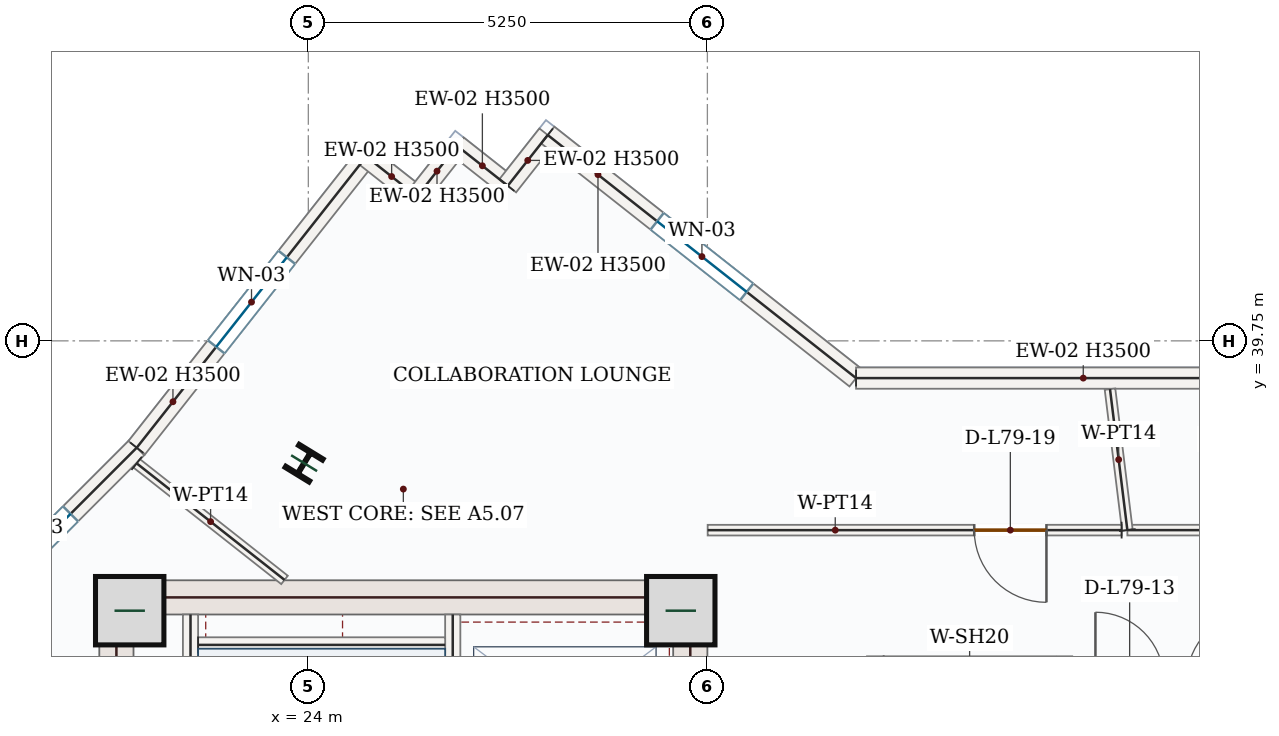
"""IFC4 building model, lengths in metres.
Left out: names, types, materials, properties, quantities, classifications, styles, units other than length and angle.
Written with IfcOpenShell. Run it as: python <this file> out.ifc"""

import sys

from ifc_helpers import new_model, si_unit, direction, frame, frame_2d, origin, origin_2d, place, context, subcontext, project, spatial, rectangle, i_section, extrude, source, transform, mapped, element, fill, save


model = new_model("IFC4")
c1 = context("Model", 3, precision=1e-05, world=origin(), true_north=direction((0.0, 1.0)))
c2 = subcontext(c1, "Body", "Model", "MODEL_VIEW")
j1 = project(units=[si_unit("LENGTHUNIT", "METRE"), si_unit("PLANEANGLEUNIT", "RADIAN")], contexts=[c1])
p1 = place(None, origin())
s1 = spatial("IfcSite", under=j1, at=p1, CompositionType="ELEMENT")
p2 = place(p1, origin())
s2 = spatial("IfcBuilding", under=s1, at=p2, CompositionType="ELEMENT")
p3 = place(p2, frame((0.0, 0.0, 327.3)))
s3 = spatial("IfcBuildingStorey", under=s2, at=p3, CompositionType="ELEMENT", Elevation=327.3)
m1 = source(origin(), c2, "Body", "SweptSolid", [
    extrude(rectangle(XDim=8.55, YDim=0.45, at=frame_2d((4.275, 0.0))), origin(), (0.0, 0.0, 1.0), 3.5),
])
p4 = place(p3, frame((21.475, 28.05, 0.0), z_axis=(0.0, 0.0, 1.0), x_axis=(0.0, 1.0, 0.0)))
e1 = element("IfcWall", 1, at=p4, inside=s3, PredefinedType="SHEAR", context=c2, shape_type="MappedRepresentation", body=[
    mapped(m1, transform((0.0, 0.0, 0.0), x_axis=(1.0, 0.0, 0.0), y_axis=(0.0, 1.0, 0.0), z_axis=(0.0, 0.0, 1.0), scale=1.0)),
])
p5 = place(p3, frame((29.025, 28.05, 0.0), z_axis=(0.0, 0.0, 1.0), x_axis=(0.0, 1.0, 0.0)))
e2 = element("IfcWall", 2, at=p5, inside=s3, PredefinedType="SHEAR", context=c2, shape_type="SweptSolid", body=[
    extrude(rectangle(XDim=8.55, YDim=0.45, at=frame_2d((4.275, 0.0))), origin(), (0.0, 0.0, 1.0), 3.5),
])
p6 = place(p5, frame((1.5, 0.0, 0.0)))
e3 = element("IfcOpeningElement", 3, at=p6, cuts=e2, PredefinedType="OPENING", context=c2, shape_type="SweptSolid", body=[
    extrude(rectangle(XDim=1.1, YDim=2.2, at=frame_2d((0.55, 1.1))), frame((0.0, 0.235, 0.0), z_axis=(0.0, -1.0, 0.0), x_axis=(1.0, 0.0, 0.0)), (0.0, 0.0, 1.0), 0.47),
])
m2 = source(origin(), c2, "Body", "SweptSolid", [
    extrude(rectangle(XDim=7.1, YDim=0.45, at=frame_2d((3.55, 0.0))), origin(), (0.0, 0.0, 1.0), 3.5),
])
p7 = place(p3, frame((21.7, 36.375, 0.0), z_axis=(0.0, 0.0, 1.0), x_axis=(1.0, 0.0, 0.0)))
e4 = element("IfcWall", 4, at=p7, inside=s3, PredefinedType="SHEAR", context=c2, shape_type="MappedRepresentation", body=[
    mapped(m2, transform((0.0, 0.0, 0.0), x_axis=(1.0, 0.0, 0.0), y_axis=(0.0, 1.0, 0.0), z_axis=(0.0, 0.0, 1.0), scale=1.0)),
])
m3 = source(origin(), c2, "Body", "SweptSolid", [
    extrude(rectangle(XDim=0.9, YDim=0.9, at=origin_2d()), origin(), (0.0, 0.0, 1.0), 3.75),
])
for number, where, z_axis, x_axis in (
    (5, (21.65, 36.2, 0.0), (0.0, 0.0, 1.0), (1.0, 0.0, 0.0)),
    (6, (28.9, 36.2, 0.0), (0.0, 0.0, 1.0), (1.0, 0.0, 0.0)),
):
    element("IfcColumn", number, at=place(p3, frame(where, z_axis=z_axis, x_axis=x_axis)), inside=s3, PredefinedType="COLUMN", context=c2, shape_type="MappedRepresentation", body=[
        mapped(m3, transform((0.0, 0.0, 0.0), x_axis=(1.0, 0.0, 0.0), y_axis=(0.0, 1.0, 0.0), z_axis=(0.0, 0.0, 1.0), scale=1.0)),
    ])
m4 = source(origin(), c2, "Body", "SweptSolid", [
    extrude(i_section(OverallWidth=0.369, OverallDepth=0.356, WebThickness=0.011, FlangeThickness=0.018, FilletRadius=0.018, at=origin_2d()), origin(), (0.0, 0.0, 1.0), 3.75),
])
p8 = place(p3, frame((23.945, 38.141, 0.0), z_axis=(0.0, 0.0, 1.0), x_axis=(-0.852640164354, 0.522498564716, 0.0)))
e7 = element("IfcColumn", 7, at=p8, inside=s3, PredefinedType="COLUMN", context=c2, shape_type="MappedRepresentation", body=[
    mapped(m4, transform((0.0, 0.0, 0.0), x_axis=(1.0, 0.0, 0.0), y_axis=(0.0, 1.0, 0.0), z_axis=(0.0, 0.0, 1.0), scale=1.0)),
])
p9 = place(p3, frame((18.94, 35.542, 0.0), z_axis=(0.0, 0.0, 1.0), x_axis=(0.707106781187, 0.707106781187, 0.0)))
e8 = element("IfcWall", 8, at=p9, inside=s3, PredefinedType="SOLIDWALL", context=c2, shape_type="SweptSolid", body=[
    extrude(rectangle(XDim=3.963, YDim=0.28, at=frame_2d((1.982, 0.0))), origin(), (0.0, 0.0, 1.0), 3.5),
])
p10 = place(p9, frame((1.232, 0.0, 0.85)))
e9 = element("IfcOpeningElement", 9, at=p10, cuts=e8, PredefinedType="OPENING", context=c2, shape_type="SweptSolid", body=[
    extrude(rectangle(XDim=1.5, YDim=1.5, at=frame_2d((0.75, 0.75))), frame((0.0, 0.15, 0.0), z_axis=(0.0, -1.0, 0.0), x_axis=(1.0, 0.0, 0.0)), (0.0, 0.0, 1.0), 0.3),
])
p11 = place(p3, frame((21.742, 38.344, 0.0), z_axis=(0.0, 0.0, 1.0), x_axis=(0.619093990715, 0.785316898239, 0.0)))
e10 = element("IfcWall", 10, at=p11, inside=s3, PredefinedType="SOLIDWALL", context=c2, shape_type="SweptSolid", body=[
    extrude(rectangle(XDim=4.878, YDim=0.28, at=frame_2d((2.439, 0.0))), origin(), (0.0, 0.0, 1.0), 3.5),
])
p12 = place(p11, frame((1.689, 0.0, 0.85)))
e11 = element("IfcOpeningElement", 11, at=p12, cuts=e10, PredefinedType="OPENING", context=c2, shape_type="SweptSolid", body=[
    extrude(rectangle(XDim=1.5, YDim=1.5, at=frame_2d((0.75, 0.75))), frame((0.0, 0.15, 0.0), z_axis=(0.0, -1.0, 0.0), x_axis=(1.0, 0.0, 0.0)), (0.0, 0.0, 1.0), 0.3),
])
m5 = source(origin(), c2, "Body", "SweptSolid", [
    extrude(rectangle(XDim=0.85, YDim=0.28, at=frame_2d((0.425, 0.0))), origin(), (0.0, 0.0, 1.0), 3.5),
])
p13 = place(p3, frame((24.762, 42.175, 0.0), z_axis=(0.0, 0.0, 1.0), x_axis=(0.785360476625, -0.619038707801, 0.0)))
e12 = element("IfcWall", 12, at=p13, inside=s3, PredefinedType="SOLIDWALL", context=c2, shape_type="MappedRepresentation", body=[
    mapped(m5, transform((0.0, 0.0, 0.0), x_axis=(1.0, 0.0, 0.0), y_axis=(0.0, 1.0, 0.0), z_axis=(0.0, 0.0, 1.0), scale=1.0)),
])
m6 = source(origin(), c2, "Body", "SweptSolid", [
    extrude(rectangle(XDim=0.85, YDim=0.28, at=frame_2d((0.425, 0.0))), origin(), (0.0, 0.0, 1.0), 3.5),
])
for number, where, z_axis, x_axis in (
    (13, (25.43, 41.649, 0.0), (0.0, 0.0, 1.0), (0.619, 0.785, 0.0)),
    (14, (25.956, 42.316, 0.0), (0.0, 0.0, 1.0), (0.785, -0.619, 0.0)),
):
    element("IfcWall", number, at=place(p3, frame(where, z_axis=z_axis, x_axis=x_axis)), inside=s3, PredefinedType="SOLIDWALL", context=c2, shape_type="MappedRepresentation", body=[
        mapped(m6, transform((0.0, 0.0, 0.0), x_axis=(1.0, 0.0, 0.0), y_axis=(0.0, 1.0, 0.0), z_axis=(0.0, 0.0, 1.0), scale=1.0)),
    ])
m7 = source(origin(), c2, "Body", "SweptSolid", [
    extrude(rectangle(XDim=0.85, YDim=0.28, at=frame_2d((0.425, 0.0))), origin(), (0.0, 0.0, 1.0), 3.5),
])
p14 = place(p3, frame((26.624, 41.79, 0.0), z_axis=(0.0, 0.0, 1.0), x_axis=(0.619076214196, 0.785330911793, 0.0)))
e15 = element("IfcWall", 15, at=p14, inside=s3, PredefinedType="SOLIDWALL", context=c2, shape_type="MappedRepresentation", body=[
    mapped(m7, transform((0.0, 0.0, 0.0), x_axis=(1.0, 0.0, 0.0), y_axis=(0.0, 1.0, 0.0), z_axis=(0.0, 0.0, 1.0), scale=1.0)),
])
p15 = place(p3, frame((27.15, 42.458, 0.0), z_axis=(0.0, 0.0, 1.0), x_axis=(0.78530363687, -0.61911081231, 0.0)))
e16 = element("IfcWall", 16, at=p15, inside=s3, PredefinedType="SOLIDWALL", context=c2, shape_type="SweptSolid", body=[
    extrude(rectangle(XDim=5.165, YDim=0.28, at=frame_2d((2.583, 0.0))), origin(), (0.0, 0.0, 1.0), 3.5),
])
p16 = place(p15, frame((1.833, 0.0, 0.85)))
e17 = element("IfcOpeningElement", 17, at=p16, cuts=e16, PredefinedType="OPENING", context=c2, shape_type="SweptSolid", body=[
    extrude(rectangle(XDim=1.5, YDim=1.5, at=frame_2d((0.75, 0.75))), frame((0.0, 0.15, 0.0), z_axis=(0.0, -1.0, 0.0), x_axis=(1.0, 0.0, 0.0)), (0.0, 0.0, 1.0), 0.3),
])
m8 = source(origin(), c2, "Body", "SweptSolid", [
    extrude(rectangle(XDim=5.978, YDim=0.28, at=frame_2d((2.989, 0.0))), origin(), (0.0, 0.0, 1.0), 3.5),
])
p17 = place(p3, frame((31.206, 39.26, 0.0), z_axis=(0.0, 0.0, 1.0), x_axis=(1.0, 0.0, 0.0)))
e18 = element("IfcWall", 18, at=p17, inside=s3, PredefinedType="SOLIDWALL", context=c2, shape_type="MappedRepresentation", body=[
    mapped(m8, transform((0.0, 0.0, 0.0), x_axis=(1.0, 0.0, 0.0), y_axis=(0.0, 1.0, 0.0), z_axis=(0.0, 0.0, 1.0), scale=1.0)),
])
m9 = source(origin(), c2, "Body", "SweptSolid", [
    extrude(rectangle(XDim=7.87, YDim=0.2, at=frame_2d((3.935, 0.0))), origin(), (0.0, 0.0, 1.0), 3.5),
])
p18 = place(p3, frame((22.45, 28.28, 0.0), z_axis=(0.0, 0.0, 1.0), x_axis=(0.0, 1.0, 0.0)))
e19 = element("IfcWall", 19, at=p18, inside=s3, PredefinedType="SOLIDWALL", context=c2, shape_type="MappedRepresentation", body=[
    mapped(m9, transform((0.0, 0.0, 0.0), x_axis=(1.0, 0.0, 0.0), y_axis=(0.0, 1.0, 0.0), z_axis=(0.0, 0.0, 1.0), scale=1.0)),
])
p19 = place(p3, frame((25.9, 28.15, 0.0), z_axis=(0.0, 0.0, 1.0), x_axis=(0.0, 1.0, 0.0)))
e20 = element("IfcWall", 20, at=p19, inside=s3, PredefinedType="SOLIDWALL", context=c2, shape_type="SweptSolid", body=[
    extrude(rectangle(XDim=8.0, YDim=0.2, at=frame_2d((4.0, 0.0))), origin(), (0.0, 0.0, 1.0), 3.5),
])
p20 = place(p19, frame((0.4, 0.0, 0.0)))
e21 = element("IfcOpeningElement", 21, at=p20, cuts=e20, PredefinedType="OPENING", context=c2, shape_type="SweptSolid", body=[
    extrude(rectangle(XDim=1.05, YDim=2.15, at=frame_2d((0.525, 1.075))), frame((0.0, 0.11, 0.0), z_axis=(0.0, -1.0, 0.0), x_axis=(1.0, 0.0, 0.0)), (0.0, 0.0, 1.0), 0.22),
])
m10 = source(origin(), c2, "Body", "SweptSolid", [
    extrude(rectangle(XDim=3.25, YDim=0.2, at=frame_2d((1.625, 0.0))), origin(), (0.0, 0.0, 1.0), 3.5),
])
p21 = place(p3, frame((22.55, 35.75, 0.0), z_axis=(0.0, 0.0, 1.0), x_axis=(1.0, 0.0, 0.0)))
e22 = element("IfcWall", 22, at=p21, inside=s3, PredefinedType="SOLIDWALL", context=c2, shape_type="MappedRepresentation", body=[
    mapped(m10, transform((0.0, 0.0, 0.0), x_axis=(1.0, 0.0, 0.0), y_axis=(0.0, 1.0, 0.0), z_axis=(0.0, 0.0, 1.0), scale=1.0)),
])
p22 = place(p3, frame((31.45, 33.2, 0.0), z_axis=(0.0, 0.0, 1.0), x_axis=(0.0, 1.0, 0.0)))
e23 = element("IfcWall", 23, at=p22, inside=s3, PredefinedType="SOLIDWALL", context=c2, shape_type="SweptSolid", body=[
    extrude(rectangle(XDim=2.4, YDim=0.2, at=frame_2d((1.2, 0.0))), origin(), (0.0, 0.0, 1.0), 3.5),
])
p23 = place(p22, frame((0.65, 0.0, 0.0)))
e24 = element("IfcOpeningElement", 24, at=p23, cuts=e23, PredefinedType="OPENING", context=c2, shape_type="SweptSolid", body=[
    extrude(rectangle(XDim=1.1, YDim=2.15, at=frame_2d((0.55, 1.075))), frame((0.0, 0.11, 0.0), z_axis=(0.0, -1.0, 0.0), x_axis=(1.0, 0.0, 0.0)), (0.0, 0.0, 1.0), 0.22),
])
m11 = source(origin(), c2, "Body", "SweptSolid", [
    extrude(rectangle(XDim=2.4, YDim=0.2, at=frame_2d((1.2, 0.0))), origin(), (0.0, 0.0, 1.0), 3.5),
])
p24 = place(p3, frame((33.95, 33.2, 0.0), z_axis=(0.0, 0.0, 1.0), x_axis=(0.0, 1.0, 0.0)))
e25 = element("IfcWall", 25, at=p24, inside=s3, PredefinedType="SOLIDWALL", context=c2, shape_type="MappedRepresentation", body=[
    mapped(m11, transform((0.0, 0.0, 0.0), x_axis=(1.0, 0.0, 0.0), y_axis=(0.0, 1.0, 0.0), z_axis=(0.0, 0.0, 1.0), scale=1.0)),
])
m12 = source(origin(), c2, "Body", "SweptSolid", [
    extrude(rectangle(XDim=2.477, YDim=0.14, at=frame_2d((1.239, 0.0))), origin(), (0.0, 0.0, 1.0), 3.5),
])
p25 = place(p3, frame((21.742, 38.138, 0.0), z_axis=(0.0, 0.0, 1.0), x_axis=(0.785339198937, -0.619065701371, 0.0)))
e26 = element("IfcWall", 26, at=p25, inside=s3, PredefinedType="PARTITIONING", context=c2, shape_type="MappedRepresentation", body=[
    mapped(m12, transform((0.0, 0.0, 0.0), x_axis=(1.0, 0.0, 0.0), y_axis=(0.0, 1.0, 0.0), z_axis=(0.0, 0.0, 1.0), scale=1.0)),
])
p26 = place(p3, frame((40.612, 37.26, 0.0), z_axis=(0.0, 0.0, 1.0), x_axis=(-1.0, 0.0, 0.0)))
e27 = element("IfcWall", 27, at=p26, inside=s3, PredefinedType="PARTITIONING", context=c2, shape_type="SweptSolid", body=[
    extrude(rectangle(XDim=5.837, YDim=0.14, at=frame_2d((2.918, 0.0))), origin(), (0.0, 0.0, 1.0), 3.5),
])
p27 = place(p26, frame((3.812, 0.0, 0.0)))
e28 = element("IfcOpeningElement", 28, at=p27, cuts=e27, PredefinedType="OPENING", context=c2, shape_type="SweptSolid", body=[
    extrude(rectangle(XDim=0.95, YDim=2.15, at=frame_2d((0.475, 1.075))), frame((0.0, 0.08, 0.0), z_axis=(0.0, -1.0, 0.0), x_axis=(1.0, 0.0, 0.0)), (0.0, 0.0, 1.0), 0.16),
])
m13 = source(origin(), c2, "Body", "SweptSolid", [
    extrude(rectangle(XDim=1.869, YDim=0.14, at=frame_2d((0.934, 0.0))), origin(), (0.0, 0.0, 1.0), 3.5),
])
p28 = place(p3, frame((34.775, 37.26, 0.0), z_axis=(0.0, 0.0, 1.0), x_axis=(-0.122153221409, 0.992511254596, 0.0)))
e29 = element("IfcWall", 29, at=p28, inside=s3, PredefinedType="PARTITIONING", context=c2, shape_type="MappedRepresentation", body=[
    mapped(m13, transform((0.0, 0.0, 0.0), x_axis=(1.0, 0.0, 0.0), y_axis=(0.0, 1.0, 0.0), z_axis=(0.0, 0.0, 1.0), scale=1.0)),
])
p29 = place(p3, frame((34.7, 37.26, 0.0), z_axis=(0.0, 0.0, 1.0), x_axis=(-0.999999995981, -8.9657955e-05, 0.0)))
e30 = element("IfcWall", 30, at=p29, inside=s3, PredefinedType="PARTITIONING", context=c2, shape_type="SweptSolid", body=[
    extrude(rectangle(XDim=5.446, YDim=0.14, at=frame_2d((2.723, 0.0))), origin(), (0.0, 0.0, 1.0), 3.5),
])
p30 = place(p29, frame((0.989, 0.0, 0.0)))
e31 = element("IfcOpeningElement", 31, at=p30, cuts=e30, PredefinedType="OPENING", context=c2, shape_type="SweptSolid", body=[
    extrude(rectangle(XDim=0.95, YDim=2.15, at=frame_2d((0.475, 1.075))), frame((0.0, 0.08, 0.0), z_axis=(0.0, -1.0, 0.0), x_axis=(1.0, 0.0, 0.0)), (0.0, 0.0, 1.0), 0.16),
])
m14 = source(origin(), c2, "Body", "SweptSolid", [
    extrude(rectangle(XDim=1.5, YDim=1.5, at=frame_2d((0.75, 0.75))), frame((0.0, 0.03, 0.0), z_axis=(0.0, -1.0, 0.0), x_axis=(1.0, 0.0, 0.0)), (0.0, 0.0, 1.0), 0.06),
])
p31 = place(p10, origin())
e32 = element("IfcWindow", 32, at=p31, inside=s3, PartitioningType="SINGLE_PANEL", PredefinedType="WINDOW", context=c2, shape_type="MappedRepresentation", body=[
    mapped(m14, transform((0.0, 0.0, 0.0), x_axis=(1.0, 0.0, 0.0), y_axis=(0.0, 1.0, 0.0), z_axis=(0.0, 0.0, 1.0), scale=1.0)),
])
fill(e9, e32)
p32 = place(p12, origin())
e33 = element("IfcWindow", 33, at=p32, inside=s3, PartitioningType="SINGLE_PANEL", PredefinedType="WINDOW", context=c2, shape_type="MappedRepresentation", body=[
    mapped(m14, transform((0.0, 0.0, 0.0), x_axis=(1.0, 0.0, 0.0), y_axis=(0.0, 1.0, 0.0), z_axis=(0.0, 0.0, 1.0), scale=1.0)),
])
fill(e11, e33)
p33 = place(p16, origin())
e34 = element("IfcWindow", 34, at=p33, inside=s3, PartitioningType="SINGLE_PANEL", PredefinedType="WINDOW", context=c2, shape_type="MappedRepresentation", body=[
    mapped(m14, transform((0.0, 0.0, 0.0), x_axis=(1.0, 0.0, 0.0), y_axis=(0.0, 1.0, 0.0), z_axis=(0.0, 0.0, 1.0), scale=1.0)),
])
fill(e17, e34)
m15 = source(origin(), c2, "Body", "SweptSolid", [
    extrude(rectangle(XDim=0.95, YDim=2.15, at=frame_2d((0.475, 1.075))), frame((0.0, 0.025, 0.0), z_axis=(0.0, -1.0, 0.0), x_axis=(1.0, 0.0, 0.0)), (0.0, 0.0, 1.0), 0.05),
])
p34 = place(p30, origin())
e35 = element("IfcDoor", 35, at=p34, inside=s3, OperationType="SINGLE_SWING_LEFT", PredefinedType="DOOR", context=c2, shape_type="MappedRepresentation", body=[
    mapped(m15, transform((0.0, 0.0, 0.0), x_axis=(1.0, 0.0, 0.0), y_axis=(0.0, 1.0, 0.0), z_axis=(0.0, 0.0, 1.0), scale=1.0)),
])
fill(e31, e35)
save(model, sys.argv[1])
